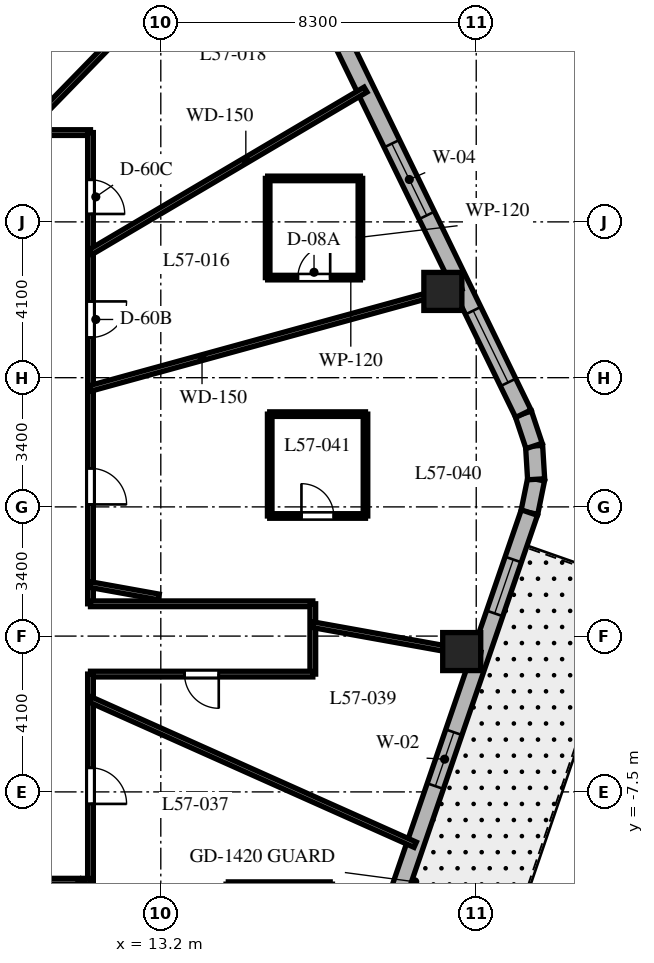
"""IFC4 building model, lengths in metres.
Left out: names, types, materials, properties, quantities, classifications, styles, units other than length and angle.
Written with IfcOpenShell. Run it as: python <this file> out.ifc"""

import sys

from ifc_helpers import new_model, si_unit, direction, frame, frame_2d, origin, origin_2d, place, context, subcontext, project, spatial, rectangle, extrude, element, fill, save


model = new_model("IFC4")
c1 = context("Model", 3, precision=1e-05, world=origin(), true_north=direction((0.0, 1.0)))
c2 = subcontext(c1, "Body", "Model", "MODEL_VIEW")
j1 = project(units=[si_unit("LENGTHUNIT", "METRE"), si_unit("PLANEANGLEUNIT", "RADIAN")], contexts=[c1])
p1 = place(None, origin())
s1 = spatial("IfcSite", under=j1, at=p1, CompositionType="ELEMENT")
p2 = place(p1, origin())
s2 = spatial("IfcBuilding", under=s1, at=p2, CompositionType="ELEMENT")
p3 = place(p2, frame((0.0, 0.0, 229.3)))
s3 = spatial("IfcBuildingStorey", under=s2, at=p3, CompositionType="ELEMENT", Elevation=229.3)
for number, where, z_axis, x_axis in (
    (1, (21.118, -3.807, 0.0), (0.0, 0.0, 1.0), (1.0, 0.0, 0.0)),
    (2, (20.622, 5.67, 0.0), (0.0, 0.0, 1.0), (1.0, 0.0, 0.0)),
):
    element("IfcColumn", number, at=place(p3, frame(where, z_axis=z_axis, x_axis=x_axis)), inside=s3, PredefinedType="COLUMN", context=c2, shape_type="SweptSolid", body=[
        extrude(rectangle(XDim=1.0, YDim=1.0, at=origin_2d()), origin(), (0.0, 0.0, 1.0), 3.8),
    ])
p4 = place(p3, frame((22.898, -0.15, 0.0), z_axis=(0.0, 0.0, 1.0), x_axis=(0.199055826889, 0.979988151858, 0.0)))
e3 = element("IfcWall", 3, at=p4, inside=s3, PredefinedType="SOLIDWALL", context=c2, shape_type="SweptSolid", body=[
    extrude(rectangle(XDim=0.894, YDim=0.45, at=frame_2d((0.447, 0.0))), origin(), (0.0, 0.0, 1.0), 3.5),
])
p5 = place(p3, frame((23.076, 0.727, 0.0), z_axis=(0.0, 0.0, 1.0), x_axis=(-0.060805222108, 0.998149650586, 0.0)))
e4 = element("IfcWall", 4, at=p5, inside=s3, PredefinedType="SOLIDWALL", context=c2, shape_type="SweptSolid", body=[
    extrude(rectangle(XDim=0.879, YDim=0.45, at=frame_2d((0.44, 0.0))), origin(), (0.0, 0.0, 1.0), 3.5),
])
p6 = place(p3, frame((23.023, 1.604, 0.0), z_axis=(0.0, 0.0, 1.0), x_axis=(-0.316801227695, 0.948491951537, 0.0)))
e5 = element("IfcWall", 5, at=p6, inside=s3, PredefinedType="SOLIDWALL", context=c2, shape_type="SweptSolid", body=[
    extrude(rectangle(XDim=0.894, YDim=0.45, at=frame_2d((0.447, 0.0))), origin(), (0.0, 0.0, 1.0), 3.5),
])
p7 = place(p3, frame((16.324, -19.275, 0.0), z_axis=(0.0, 0.0, 1.0), x_axis=(0.325083142304, 0.945685439557, 0.0)))
e6 = element("IfcWall", 6, at=p7, inside=s3, PredefinedType="SOLIDWALL", context=c2, shape_type="SweptSolid", body=[
    extrude(rectangle(XDim=20.224, YDim=0.45, at=frame_2d((10.112, 0.0))), origin(), (0.0, 0.0, 1.0), 3.5),
])
p8 = place(p7, frame((5.062, 0.0, 0.0)))
e7 = element("IfcOpeningElement", 7, at=p8, cuts=e6, PredefinedType="OPENING", context=c2, shape_type="SweptSolid", body=[
    extrude(rectangle(XDim=0.95, YDim=2.15, at=frame_2d((0.475, 1.075))), frame((0.0, 0.235, 0.0), z_axis=(0.0, -1.0, 0.0), x_axis=(1.0, 0.0, 0.0)), (0.0, 0.0, 1.0), 0.47),
])
p9 = place(p7, frame((1.253, 0.0, 0.8)))
e8 = element("IfcOpeningElement", 8, at=p9, cuts=e6, PredefinedType="OPENING", context=c2, shape_type="SweptSolid", body=[
    extrude(rectangle(XDim=1.5, YDim=1.8, at=frame_2d((0.75, 0.9))), frame((0.0, 0.235, 0.0), z_axis=(0.0, -1.0, 0.0), x_axis=(1.0, 0.0, 0.0)), (0.0, 0.0, 1.0), 0.47),
])
p10 = place(p7, frame((6.929, 0.0, 0.8)))
e9 = element("IfcOpeningElement", 9, at=p10, cuts=e6, PredefinedType="OPENING", context=c2, shape_type="SweptSolid", body=[
    extrude(rectangle(XDim=1.5, YDim=1.8, at=frame_2d((0.75, 0.9))), frame((0.0, 0.235, 0.0), z_axis=(0.0, -1.0, 0.0), x_axis=(1.0, 0.0, 0.0)), (0.0, 0.0, 1.0), 0.47),
])
p11 = place(p7, frame((12.612, 0.0, 0.8)))
e10 = element("IfcOpeningElement", 10, at=p11, cuts=e6, PredefinedType="OPENING", context=c2, shape_type="SweptSolid", body=[
    extrude(rectangle(XDim=1.5, YDim=1.8, at=frame_2d((0.75, 0.9))), frame((0.0, 0.235, 0.0), z_axis=(0.0, -1.0, 0.0), x_axis=(1.0, 0.0, 0.0)), (0.0, 0.0, 1.0), 0.47),
])
p12 = place(p7, frame((17.418, 0.0, 0.8)))
e11 = element("IfcOpeningElement", 11, at=p12, cuts=e6, PredefinedType="OPENING", context=c2, shape_type="SweptSolid", body=[
    extrude(rectangle(XDim=1.5, YDim=1.8, at=frame_2d((0.75, 0.9))), frame((0.0, 0.235, 0.0), z_axis=(0.0, -1.0, 0.0), x_axis=(1.0, 0.0, 0.0)), (0.0, 0.0, 1.0), 0.47),
])
p13 = place(p3, frame((22.74, 2.452, 0.0), z_axis=(0.0, 0.0, 1.0), x_axis=(-0.437753424814, 0.899095066755, 0.0)))
e12 = element("IfcWall", 12, at=p13, inside=s3, PredefinedType="SOLIDWALL", context=c2, shape_type="SweptSolid", body=[
    extrude(rectangle(XDim=19.137, YDim=0.45, at=frame_2d((9.569, 0.0))), origin(), (0.0, 0.0, 1.0), 3.5),
])
p14 = place(p13, frame((5.805, 0.0, 0.8)))
e13 = element("IfcOpeningElement", 13, at=p14, cuts=e12, PredefinedType="OPENING", context=c2, shape_type="SweptSolid", body=[
    extrude(rectangle(XDim=2.1, YDim=1.85, at=frame_2d((1.05, 0.925))), frame((0.0, 0.235, 0.0), z_axis=(0.0, -1.0, 0.0), x_axis=(1.0, 0.0, 0.0)), (0.0, 0.0, 1.0), 0.47),
])
p15 = place(p13, frame((11.199, 0.0, 0.8)))
e14 = element("IfcOpeningElement", 14, at=p15, cuts=e12, PredefinedType="OPENING", context=c2, shape_type="SweptSolid", body=[
    extrude(rectangle(XDim=2.1, YDim=1.85, at=frame_2d((1.05, 0.925))), frame((0.0, 0.235, 0.0), z_axis=(0.0, -1.0, 0.0), x_axis=(1.0, 0.0, 0.0)), (0.0, 0.0, 1.0), 0.47),
])
p16 = place(p13, frame((16.173, 0.0, 0.8)))
e15 = element("IfcOpeningElement", 15, at=p16, cuts=e12, PredefinedType="OPENING", context=c2, shape_type="SweptSolid", body=[
    extrude(rectangle(XDim=2.1, YDim=1.85, at=frame_2d((1.05, 0.925))), frame((0.0, 0.235, 0.0), z_axis=(0.0, -1.0, 0.0), x_axis=(1.0, 0.0, 0.0)), (0.0, 0.0, 1.0), 0.47),
])
p17 = place(p13, frame((0.916, 0.0, 0.8)))
e16 = element("IfcOpeningElement", 16, at=p17, cuts=e12, PredefinedType="OPENING", context=c2, shape_type="SweptSolid", body=[
    extrude(rectangle(XDim=2.1, YDim=1.85, at=frame_2d((1.05, 0.925))), frame((0.0, 0.235, 0.0), z_axis=(0.0, -1.0, 0.0), x_axis=(1.0, 0.0, 0.0)), (0.0, 0.0, 1.0), 0.47),
])
p18 = place(p3, frame((0.92, 9.85, 0.0), z_axis=(0.0, 0.0, 1.0), x_axis=(1.0, 0.0, 0.0)))
e17 = element("IfcWall", 17, at=p18, inside=s3, PredefinedType="PARTITIONING", context=c2, shape_type="SweptSolid", body=[
    extrude(rectangle(XDim=10.43, YDim=0.15, at=frame_2d((5.215, 0.0))), origin(), (0.0, 0.0, 1.0), 2.99),
])
p19 = place(p18, frame((4.949, 0.0, 0.0)))
e18 = element("IfcOpeningElement", 18, at=p19, cuts=e17, PredefinedType="OPENING", context=c2, shape_type="SweptSolid", body=[
    extrude(rectangle(XDim=0.95, YDim=2.03, at=frame_2d((0.475, 1.015))), frame((0.0, 0.085, 0.0), z_axis=(0.0, -1.0, 0.0), x_axis=(1.0, 0.0, 0.0)), (0.0, 0.0, 1.0), 0.17),
])
p20 = place(p3, frame((11.35, 9.85, 0.0), z_axis=(0.0, 0.0, 1.0), x_axis=(0.0, -1.0, 0.0)))
e19 = element("IfcWall", 19, at=p20, inside=s3, PredefinedType="PARTITIONING", context=c2, shape_type="SweptSolid", body=[
    extrude(rectangle(XDim=12.4, YDim=0.15, at=frame_2d((6.2, 0.0))), origin(), (0.0, 0.0, 1.0), 2.99),
])
p21 = place(p20, frame((4.443, 0.0, 0.0)))
e20 = element("IfcOpeningElement", 20, at=p21, cuts=e19, PredefinedType="OPENING", context=c2, shape_type="SweptSolid", body=[
    extrude(rectangle(XDim=0.95, YDim=2.03, at=frame_2d((0.475, 1.015))), frame((0.0, 0.085, 0.0), z_axis=(0.0, -1.0, 0.0), x_axis=(1.0, 0.0, 0.0)), (0.0, 0.0, 1.0), 0.17),
])
p22 = place(p20, frame((1.242, 0.0, 0.0)))
e21 = element("IfcOpeningElement", 21, at=p22, cuts=e19, PredefinedType="OPENING", context=c2, shape_type="SweptSolid", body=[
    extrude(rectangle(XDim=0.9, YDim=2.03, at=frame_2d((0.45, 1.015))), frame((0.0, 0.085, 0.0), z_axis=(0.0, -1.0, 0.0), x_axis=(1.0, 0.0, 0.0)), (0.0, 0.0, 1.0), 0.17),
])
p23 = place(p20, frame((8.835, 0.0, 0.0)))
e22 = element("IfcOpeningElement", 22, at=p23, cuts=e19, PredefinedType="OPENING", context=c2, shape_type="SweptSolid", body=[
    extrude(rectangle(XDim=0.95, YDim=2.03, at=frame_2d((0.475, 1.015))), frame((0.0, 0.085, 0.0), z_axis=(0.0, -1.0, 0.0), x_axis=(1.0, 0.0, 0.0)), (0.0, 0.0, 1.0), 0.17),
])
p24 = place(p3, frame((11.35, -2.55, 0.0), z_axis=(0.0, 0.0, 1.0), x_axis=(1.0, 0.0, 0.0)))
e23 = element("IfcWall", 23, at=p24, inside=s3, PredefinedType="PARTITIONING", context=c2, shape_type="SweptSolid", body=[
    extrude(rectangle(XDim=5.85, YDim=0.15, at=frame_2d((2.925, 0.0))), origin(), (0.0, 0.0, 1.0), 2.94),
])
p25 = place(p3, frame((17.2, -2.55, 0.0), z_axis=(0.0, 0.0, 1.0), x_axis=(0.0, -1.0, 0.0)))
e24 = element("IfcWall", 24, at=p25, inside=s3, PredefinedType="PARTITIONING", context=c2, shape_type="SweptSolid", body=[
    extrude(rectangle(XDim=1.85, YDim=0.15, at=frame_2d((0.925, 0.0))), origin(), (0.0, 0.0, 1.0), 2.94),
])
p26 = place(p3, frame((17.2, -4.4, 0.0), z_axis=(0.0, 0.0, 1.0), x_axis=(-1.0, 0.0, 0.0)))
e25 = element("IfcWall", 25, at=p26, inside=s3, PredefinedType="PARTITIONING", context=c2, shape_type="SweptSolid", body=[
    extrude(rectangle(XDim=5.85, YDim=0.15, at=frame_2d((2.925, 0.0))), origin(), (0.0, 0.0, 1.0), 2.94),
])
p27 = place(p26, frame((2.475, 0.0, 0.0)))
e26 = element("IfcOpeningElement", 26, at=p27, cuts=e25, PredefinedType="OPENING", context=c2, shape_type="SweptSolid", body=[
    extrude(rectangle(XDim=0.9, YDim=2.03, at=frame_2d((0.45, 1.015))), frame((0.0, 0.085, 0.0), z_axis=(0.0, -1.0, 0.0), x_axis=(1.0, 0.0, 0.0)), (0.0, 0.0, 1.0), 0.17),
])
p28 = place(p3, frame((11.35, -4.4, 0.0), z_axis=(0.0, 0.0, 1.0), x_axis=(0.0, -1.0, 0.0)))
e27 = element("IfcWall", 27, at=p28, inside=s3, PredefinedType="PARTITIONING", context=c2, shape_type="SweptSolid", body=[
    extrude(rectangle(XDim=5.45, YDim=0.15, at=frame_2d((2.725, 0.0))), origin(), (0.0, 0.0, 1.0), 2.99),
])
p29 = place(p28, frame((2.466, 0.0, 0.0)))
e28 = element("IfcOpeningElement", 28, at=p29, cuts=e27, PredefinedType="OPENING", context=c2, shape_type="SweptSolid", body=[
    extrude(rectangle(XDim=0.95, YDim=2.03, at=frame_2d((0.475, 1.015))), frame((0.0, 0.085, 0.0), z_axis=(0.0, -1.0, 0.0), x_axis=(1.0, 0.0, 0.0)), (0.0, 0.0, 1.0), 0.17),
])
p30 = place(p3, frame((11.35, -9.85, 0.0), z_axis=(0.0, 0.0, 1.0), x_axis=(-1.0, 0.0, 0.0)))
e29 = element("IfcWall", 29, at=p30, inside=s3, PredefinedType="PARTITIONING", context=c2, shape_type="SweptSolid", body=[
    extrude(rectangle(XDim=10.43, YDim=0.15, at=frame_2d((5.215, 0.0))), origin(), (0.0, 0.0, 1.0), 2.99),
])
p31 = place(p30, frame((8.362, 0.0, 0.0)))
e30 = element("IfcOpeningElement", 30, at=p31, cuts=e29, PredefinedType="OPENING", context=c2, shape_type="SweptSolid", body=[
    extrude(rectangle(XDim=0.95, YDim=2.03, at=frame_2d((0.475, 1.015))), frame((0.0, 0.085, 0.0), z_axis=(0.0, -1.0, 0.0), x_axis=(1.0, 0.0, 0.0)), (0.0, 0.0, 1.0), 0.17),
])
p32 = place(p30, frame((3.396, 0.0, 0.0)))
e31 = element("IfcOpeningElement", 31, at=p32, cuts=e29, PredefinedType="OPENING", context=c2, shape_type="SweptSolid", body=[
    extrude(rectangle(XDim=0.95, YDim=2.03, at=frame_2d((0.475, 1.015))), frame((0.0, 0.085, 0.0), z_axis=(0.0, -1.0, 0.0), x_axis=(1.0, 0.0, 0.0)), (0.0, 0.0, 1.0), 0.17),
])
p33 = place(p3, frame((11.35, 3.121, 0.0), z_axis=(0.0, 0.0, 1.0), x_axis=(0.964212793822, 0.265129568758, 0.0)))
e32 = element("IfcWall", 32, at=p33, inside=s3, PredefinedType="PARTITIONING", context=c2, shape_type="SweptSolid", body=[
    extrude(rectangle(XDim=10.12, YDim=0.15, at=frame_2d((5.06, 0.0))), origin(), (0.0, 0.0, 1.0), 2.74),
])
p34 = place(p3, frame((11.35, 6.705, 0.0), z_axis=(0.0, 0.0, 1.0), x_axis=(0.86097625004, 0.508645158108, 0.0)))
e33 = element("IfcWall", 33, at=p34, inside=s3, PredefinedType="PARTITIONING", context=c2, shape_type="SweptSolid", body=[
    extrude(rectangle(XDim=8.406, YDim=0.15, at=frame_2d((4.203, 0.0))), origin(), (0.0, 0.0, 1.0), 2.74),
])
p35 = place(p3, frame((9.588, 9.85, 0.0), z_axis=(0.0, 0.0, 1.0), x_axis=(0.697519469595, 0.716565830567, 0.0)))
e34 = element("IfcWall", 34, at=p35, inside=s3, PredefinedType="PARTITIONING", context=c2, shape_type="SweptSolid", body=[
    extrude(rectangle(XDim=9.126, YDim=0.15, at=frame_2d((4.563, 0.0))), origin(), (0.0, 0.0, 1.0), 2.74),
])
p36 = place(p3, frame((11.048, -9.85, 0.0), z_axis=(0.0, 0.0, 1.0), x_axis=(0.746444434655, -0.665447748492, 0.0)))
e35 = element("IfcWall", 35, at=p36, inside=s3, PredefinedType="PARTITIONING", context=c2, shape_type="SweptSolid", body=[
    extrude(rectangle(XDim=8.732, YDim=0.15, at=frame_2d((4.366, 0.0))), origin(), (0.0, 0.0, 1.0), 2.74),
])
p37 = place(p3, frame((11.35, -5.072, 0.0), z_axis=(0.0, 0.0, 1.0), x_axis=(0.912980177983, -0.408003914944, 0.0)))
e36 = element("IfcWall", 36, at=p37, inside=s3, PredefinedType="PARTITIONING", context=c2, shape_type="SweptSolid", body=[
    extrude(rectangle(XDim=9.358, YDim=0.15, at=frame_2d((4.679, 0.0))), origin(), (0.0, 0.0, 1.0), 2.74),
])
p38 = place(p3, frame((11.35, -2.046, 0.0), z_axis=(0.0, 0.0, 1.0), x_axis=(0.984127783205, -0.177461281195, 0.0)))
e37 = element("IfcWall", 37, at=p38, inside=s3, PredefinedType="PARTITIONING", context=c2, shape_type="SweptSolid", body=[
    extrude(rectangle(XDim=1.826, YDim=0.15, at=frame_2d((0.913, 0.0))), origin(), (0.0, 0.0, 1.0), 3.5),
])
p39 = place(p3, frame((17.2, -3.101, 0.0), z_axis=(0.0, 0.0, 1.0), x_axis=(0.98413465883, -0.177423147559, 0.0)))
e38 = element("IfcWall", 38, at=p39, inside=s3, PredefinedType="PARTITIONING", context=c2, shape_type="SweptSolid", body=[
    extrude(rectangle(XDim=4.482, YDim=0.15, at=frame_2d((2.241, 0.0))), origin(), (0.0, 0.0, 1.0), 2.74),
])
p40 = place(p3, frame((16.012, 6.034, 0.0), z_axis=(0.0, 0.0, 1.0), x_axis=(1.0, 0.0, 0.0)))
e39 = element("IfcWall", 39, at=p40, inside=s3, PredefinedType="PARTITIONING", context=c2, shape_type="SweptSolid", body=[
    extrude(rectangle(XDim=2.44, YDim=0.12, at=frame_2d((1.22, 0.0))), origin(), (0.0, 0.0, 1.0), 2.94),
])
p41 = place(p40, frame((0.795, 0.0, 0.0)))
e40 = element("IfcOpeningElement", 40, at=p41, cuts=e39, PredefinedType="OPENING", context=c2, shape_type="SweptSolid", body=[
    extrude(rectangle(XDim=0.85, YDim=2.03, at=frame_2d((0.425, 1.015))), frame((0.0, 0.07, 0.0), z_axis=(0.0, -1.0, 0.0), x_axis=(1.0, 0.0, 0.0)), (0.0, 0.0, 1.0), 0.14),
])
p42 = place(p3, frame((18.452, 6.034, 0.0), z_axis=(0.0, 0.0, 1.0), x_axis=(0.0, 1.0, 0.0)))
e41 = element("IfcWall", 41, at=p42, inside=s3, PredefinedType="PARTITIONING", context=c2, shape_type="SweptSolid", body=[
    extrude(rectangle(XDim=2.61, YDim=0.12, at=frame_2d((1.305, 0.0))), origin(), (0.0, 0.0, 1.0), 2.99),
])
p43 = place(p3, frame((18.452, 8.644, 0.0), z_axis=(0.0, 0.0, 1.0), x_axis=(-1.0, 0.0, 0.0)))
e42 = element("IfcWall", 42, at=p43, inside=s3, PredefinedType="PARTITIONING", context=c2, shape_type="SweptSolid", body=[
    extrude(rectangle(XDim=2.44, YDim=0.12, at=frame_2d((1.22, 0.0))), origin(), (0.0, 0.0, 1.0), 3.5),
])
p44 = place(p3, frame((16.012, 8.644, 0.0), z_axis=(0.0, 0.0, 1.0), x_axis=(0.0, -1.0, 0.0)))
e43 = element("IfcWall", 43, at=p44, inside=s3, PredefinedType="PARTITIONING", context=c2, shape_type="SweptSolid", body=[
    extrude(rectangle(XDim=2.61, YDim=0.12, at=frame_2d((1.305, 0.0))), origin(), (0.0, 0.0, 1.0), 2.99),
])
p45 = place(p3, frame((17.657, -9.928, 0.0), z_axis=(0.0, 0.0, 1.0), x_axis=(-1.0, 0.0, 0.0)))
e44 = element("IfcWall", 44, at=p45, inside=s3, PredefinedType="PARTITIONING", context=c2, shape_type="SweptSolid", body=[
    extrude(rectangle(XDim=2.68, YDim=0.12, at=frame_2d((1.34, 0.0))), origin(), (0.0, 0.0, 1.0), 3.072),
])
p46 = place(p3, frame((16.066, -0.239, 0.0), z_axis=(0.0, 0.0, 1.0), x_axis=(1.0, 0.0, 0.0)))
e45 = element("IfcWall", 45, at=p46, inside=s3, PredefinedType="PARTITIONING", context=c2, shape_type="SweptSolid", body=[
    extrude(rectangle(XDim=2.52, YDim=0.12, at=frame_2d((1.26, 0.0))), origin(), (0.0, 0.0, 1.0), 2.94),
])
p47 = place(p46, frame((0.835, 0.0, 0.0)))
e46 = element("IfcOpeningElement", 46, at=p47, cuts=e45, PredefinedType="OPENING", context=c2, shape_type="SweptSolid", body=[
    extrude(rectangle(XDim=0.85, YDim=2.03, at=frame_2d((0.425, 1.015))), frame((0.0, 0.07, 0.0), z_axis=(0.0, -1.0, 0.0), x_axis=(1.0, 0.0, 0.0)), (0.0, 0.0, 1.0), 0.14),
])
p48 = place(p3, frame((18.586, -0.239, 0.0), z_axis=(0.0, 0.0, 1.0), x_axis=(0.0, 1.0, 0.0)))
e47 = element("IfcWall", 47, at=p48, inside=s3, PredefinedType="PARTITIONING", context=c2, shape_type="SweptSolid", body=[
    extrude(rectangle(XDim=2.68, YDim=0.12, at=frame_2d((1.34, 0.0))), origin(), (0.0, 0.0, 1.0), 3.5),
])
p49 = place(p3, frame((18.586, 2.441, 0.0), z_axis=(0.0, 0.0, 1.0), x_axis=(-1.0, 0.0, 0.0)))
e48 = element("IfcWall", 48, at=p49, inside=s3, PredefinedType="PARTITIONING", context=c2, shape_type="SweptSolid", body=[
    extrude(rectangle(XDim=2.52, YDim=0.12, at=frame_2d((1.26, 0.0))), origin(), (0.0, 0.0, 1.0), 2.94),
])
p50 = place(p3, frame((16.066, 2.441, 0.0), z_axis=(0.0, 0.0, 1.0), x_axis=(0.0, -1.0, 0.0)))
e49 = element("IfcWall", 49, at=p50, inside=s3, PredefinedType="PARTITIONING", context=c2, shape_type="SweptSolid", body=[
    extrude(rectangle(XDim=2.68, YDim=0.12, at=frame_2d((1.34, 0.0))), origin(), (0.0, 0.0, 1.0), 3.5),
])
p51 = place(p11, origin())
e50 = element("IfcWindow", 50, at=p51, inside=s3, PartitioningType="SINGLE_PANEL", PredefinedType="WINDOW", context=c2, shape_type="SweptSolid", body=[
    extrude(rectangle(XDim=1.5, YDim=1.8, at=frame_2d((0.75, 0.9))), frame((0.0, 0.03, 0.0), z_axis=(0.0, -1.0, 0.0), x_axis=(1.0, 0.0, 0.0)), (0.0, 0.0, 1.0), 0.06),
])
fill(e10, e50)
p52 = place(p12, origin())
e51 = element("IfcWindow", 51, at=p52, inside=s3, PartitioningType="SINGLE_PANEL", PredefinedType="WINDOW", context=c2, shape_type="SweptSolid", body=[
    extrude(rectangle(XDim=1.5, YDim=1.8, at=frame_2d((0.75, 0.9))), frame((0.0, 0.03, 0.0), z_axis=(0.0, -1.0, 0.0), x_axis=(1.0, 0.0, 0.0)), (0.0, 0.0, 1.0), 0.06),
])
fill(e11, e51)
p53 = place(p14, origin())
e52 = element("IfcWindow", 52, at=p53, inside=s3, PartitioningType="SINGLE_PANEL", PredefinedType="WINDOW", context=c2, shape_type="SweptSolid", body=[
    extrude(rectangle(XDim=2.1, YDim=1.85, at=frame_2d((1.05, 0.925))), frame((0.0, 0.03, 0.0), z_axis=(0.0, -1.0, 0.0), x_axis=(1.0, 0.0, 0.0)), (0.0, 0.0, 1.0), 0.06),
])
fill(e13, e52)
p54 = place(p17, origin())
e53 = element("IfcWindow", 53, at=p54, inside=s3, PartitioningType="SINGLE_PANEL", PredefinedType="WINDOW", context=c2, shape_type="SweptSolid", body=[
    extrude(rectangle(XDim=2.1, YDim=1.85, at=frame_2d((1.05, 0.925))), frame((0.0, 0.03, 0.0), z_axis=(0.0, -1.0, 0.0), x_axis=(1.0, 0.0, 0.0)), (0.0, 0.0, 1.0), 0.06),
])
fill(e16, e53)
p55 = place(p21, origin())
e54 = element("IfcDoor", 54, at=p55, inside=s3, OperationType="SINGLE_SWING_LEFT", PredefinedType="DOOR", context=c2, shape_type="SweptSolid", body=[
    extrude(rectangle(XDim=0.95, YDim=2.03, at=frame_2d((0.475, 1.015))), frame((0.0, 0.025, 0.0), z_axis=(0.0, -1.0, 0.0), x_axis=(1.0, 0.0, 0.0)), (0.0, 0.0, 1.0), 0.05),
])
fill(e20, e54)
p56 = place(p41, origin())
e55 = element("IfcDoor", 55, at=p56, inside=s3, OperationType="SINGLE_SWING_RIGHT", PredefinedType="DOOR", context=c2, shape_type="SweptSolid", body=[
    extrude(rectangle(XDim=0.85, YDim=2.03, at=frame_2d((0.425, 1.015))), frame((0.0, 0.025, 0.0), z_axis=(0.0, -1.0, 0.0), x_axis=(1.0, 0.0, 0.0)), (0.0, 0.0, 1.0), 0.05),
])
fill(e40, e55)
p57 = place(p22, origin())
e56 = element("IfcDoor", 56, at=p57, inside=s3, OperationType="SINGLE_SWING_RIGHT", PredefinedType="DOOR", context=c2, shape_type="SweptSolid", body=[
    extrude(rectangle(XDim=0.9, YDim=2.03, at=frame_2d((0.45, 1.015))), frame((0.0, 0.025, 0.0), z_axis=(0.0, -1.0, 0.0), x_axis=(1.0, 0.0, 0.0)), (0.0, 0.0, 1.0), 0.05),
])
fill(e21, e56)
p58 = place(p29, origin())
e57 = element("IfcDoor", 57, at=p58, inside=s3, OperationType="SINGLE_SWING_RIGHT", PredefinedType="DOOR", context=c2, shape_type="SweptSolid", body=[
    extrude(rectangle(XDim=0.95, YDim=2.03, at=frame_2d((0.475, 1.015))), frame((0.0, 0.025, 0.0), z_axis=(0.0, -1.0, 0.0), x_axis=(1.0, 0.0, 0.0)), (0.0, 0.0, 1.0), 0.05),
])
fill(e28, e57)
p59 = place(p27, origin())
e58 = element("IfcDoor", 58, at=p59, inside=s3, OperationType="SINGLE_SWING_LEFT", PredefinedType="DOOR", context=c2, shape_type="SweptSolid", body=[
    extrude(rectangle(XDim=0.9, YDim=2.03, at=frame_2d((0.45, 1.015))), frame((0.0, 0.025, 0.0), z_axis=(0.0, -1.0, 0.0), x_axis=(1.0, 0.0, 0.0)), (0.0, 0.0, 1.0), 0.05),
])
fill(e26, e58)
p60 = place(p23, origin())
e59 = element("IfcDoor", 59, at=p60, inside=s3, OperationType="SINGLE_SWING_RIGHT", PredefinedType="DOOR", context=c2, shape_type="SweptSolid", body=[
    extrude(rectangle(XDim=0.95, YDim=2.03, at=frame_2d((0.475, 1.015))), frame((0.0, 0.025, 0.0), z_axis=(0.0, -1.0, 0.0), x_axis=(1.0, 0.0, 0.0)), (0.0, 0.0, 1.0), 0.05),
])
fill(e22, e59)
p61 = place(p47, origin())
e60 = element("IfcDoor", 60, at=p61, inside=s3, OperationType="SINGLE_SWING_LEFT", PredefinedType="DOOR", context=c2, shape_type="SweptSolid", body=[
    extrude(rectangle(XDim=0.85, YDim=2.03, at=frame_2d((0.425, 1.015))), frame((0.0, 0.025, 0.0), z_axis=(0.0, -1.0, 0.0), x_axis=(1.0, 0.0, 0.0)), (0.0, 0.0, 1.0), 0.05),
])
fill(e46, e60)
save(model, sys.argv[1])
